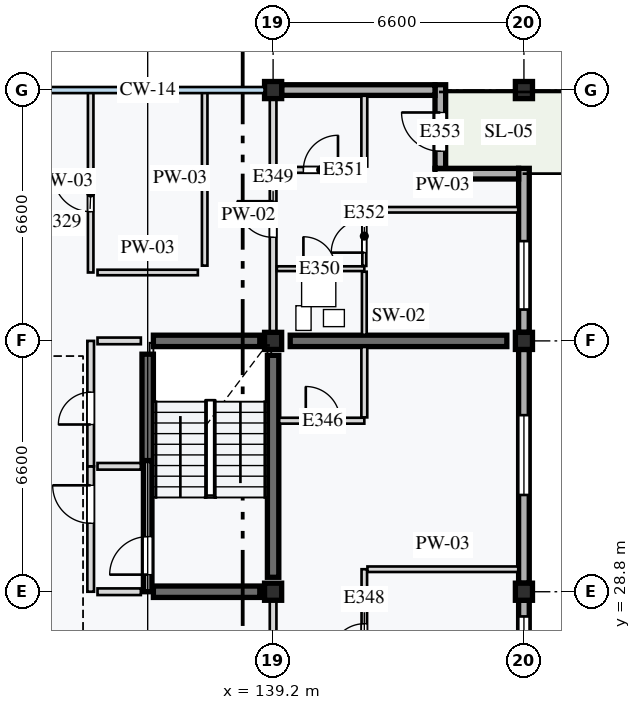
"""IFC4 building model, lengths in metres.
Left out: names, types, materials, properties, quantities, classifications, styles, units other than length and angle.
Written with IfcOpenShell. Run it as: python <this file> out.ifc"""

import sys

from ifc_helpers import new_model, si_unit, direction, frame, frame_2d, origin, origin_2d, place, context, subcontext, project, spatial, rectangle, extrude, element, fill, save


model = new_model("IFC4")
c1 = context("Model", 3, precision=1e-05, world=origin(), true_north=direction((0.0, 1.0)))
c2 = subcontext(c1, "Body", "Model", "MODEL_VIEW")
j1 = project(units=[si_unit("LENGTHUNIT", "METRE"), si_unit("PLANEANGLEUNIT", "RADIAN")], contexts=[c1])
p1 = place(None, origin())
s1 = spatial("IfcSite", under=j1, at=p1, CompositionType="ELEMENT")
p2 = place(p1, origin())
s2 = spatial("IfcBuilding", under=s1, at=p2, CompositionType="ELEMENT")
p3 = place(p2, frame((0.0, 0.0, 27.6)))
s3 = spatial("IfcBuildingStorey", under=s2, at=p3, CompositionType="ELEMENT", Elevation=27.6)
for number, where, z_axis, x_axis in (
    (1, (139.2, 28.8, 0.0), (0.0, 0.0, 1.0), (1.0, 0.0, 0.0)),
    (2, (145.8, 28.8, 0.0), (0.0, 0.0, 1.0), (1.0, 0.0, 0.0)),
    (3, (139.2, 35.4, 0.0), (0.0, 0.0, 1.0), (1.0, 0.0, 0.0)),
    (4, (145.8, 35.4, 0.0), (0.0, 0.0, 1.0), (1.0, 0.0, 0.0)),
    (5, (139.2, 42.0, 0.0), (0.0, 0.0, 1.0), (1.0, 0.0, 0.0)),
    (6, (145.8, 42.0, 0.0), (0.0, 0.0, 1.0), (1.0, 0.0, 0.0)),
):
    element("IfcColumn", number, at=place(p3, frame(where, z_axis=z_axis, x_axis=x_axis)), inside=s3, PredefinedType="COLUMN", context=c2, shape_type="SweptSolid", body=[
        extrude(rectangle(XDim=0.45, YDim=0.45, at=origin_2d()), origin(), (0.0, 0.0, 1.0), 3.2),
    ])
p4 = place(p3, frame((139.2, 29.18, 0.0), z_axis=(0.0, 0.0, 1.0), x_axis=(0.0, 1.0, 0.0)))
e7 = element("IfcWall", 7, at=p4, inside=s3, PredefinedType="SHEAR", context=c2, shape_type="SweptSolid", body=[
    extrude(rectangle(XDim=5.84, YDim=0.3, at=frame_2d((2.92, 0.0))), origin(), (0.0, 0.0, 1.0), 2.97),
])
for number, where, z_axis, x_axis in (
    (8, (135.9, 32.25, 0.0), (0.0, 0.0, 1.0), (0.0, 1.0, 0.0)),
    (9, (136.05, 28.8, 0.0), (0.0, 0.0, 1.0), (1.0, 0.0, 0.0)),
    (10, (136.05, 35.4, 0.0), (0.0, 0.0, 1.0), (1.0, 0.0, 0.0)),
):
    element("IfcWall", number, at=place(p3, frame(where, z_axis=z_axis, x_axis=x_axis)), inside=s3, PredefinedType="SHEAR", context=c2, shape_type="SweptSolid", body=[
        extrude(rectangle(XDim=2.8, YDim=0.3, at=frame_2d((1.4, 0.0))), origin(), (0.0, 0.0, 1.0), 2.97),
    ])
p5 = place(p3, frame((139.65, 35.4, 0.0), z_axis=(0.0, 0.0, 1.0), x_axis=(1.0, 0.0, 0.0)))
e11 = element("IfcWall", 11, at=p5, inside=s3, PredefinedType="SHEAR", context=c2, shape_type="SweptSolid", body=[
    extrude(rectangle(XDim=5.7, YDim=0.3, at=frame_2d((2.85, 0.0))), origin(), (0.0, 0.0, 1.0), 2.97),
])
p6 = place(p3, frame((145.8, 22.425, 0.0), z_axis=(0.0, 0.0, 1.0), x_axis=(0.0, 1.0, 0.0)))
e12 = element("IfcWall", 12, at=p6, inside=s3, PredefinedType="STANDARD", context=c2, shape_type="SweptSolid", body=[
    extrude(rectangle(XDim=6.15, YDim=0.28, at=frame_2d((3.075, 0.0))), origin(), (0.0, 0.0, 1.0), 2.65),
])
p7 = place(p6, frame((0.5, 0.0, 0.85)))
e13 = element("IfcOpeningElement", 13, at=p7, cuts=e12, PredefinedType="OPENING", context=c2, shape_type="SweptSolid", body=[
    extrude(rectangle(XDim=1.8, YDim=1.35, at=frame_2d((0.9, 0.675))), frame((0.0, 0.15, 0.0), z_axis=(0.0, -1.0, 0.0), x_axis=(1.0, 0.0, 0.0)), (0.0, 0.0, 1.0), 0.3),
])
p8 = place(p6, frame((3.925, 0.0, 0.85)))
e14 = element("IfcOpeningElement", 14, at=p8, cuts=e12, PredefinedType="OPENING", context=c2, shape_type="SweptSolid", body=[
    extrude(rectangle(XDim=1.8, YDim=1.35, at=frame_2d((0.9, 0.675))), frame((0.0, 0.15, 0.0), z_axis=(0.0, -1.0, 0.0), x_axis=(1.0, 0.0, 0.0)), (0.0, 0.0, 1.0), 0.3),
])
p9 = place(p3, frame((145.8, 29.025, 0.0), z_axis=(0.0, 0.0, 1.0), x_axis=(0.0, 1.0, 0.0)))
e15 = element("IfcWall", 15, at=p9, inside=s3, PredefinedType="STANDARD", context=c2, shape_type="SweptSolid", body=[
    extrude(rectangle(XDim=6.15, YDim=0.28, at=frame_2d((3.075, 0.0))), origin(), (0.0, 0.0, 1.0), 2.65),
])
p10 = place(p9, frame((2.321, 0.0, 0.85)))
e16 = element("IfcOpeningElement", 16, at=p10, cuts=e15, PredefinedType="OPENING", context=c2, shape_type="SweptSolid", body=[
    extrude(rectangle(XDim=2.1, YDim=1.55, at=frame_2d((1.05, 0.775))), frame((0.0, 0.15, 0.0), z_axis=(0.0, -1.0, 0.0), x_axis=(1.0, 0.0, 0.0)), (0.0, 0.0, 1.0), 0.3),
])
p11 = place(p3, frame((145.8, 35.625, 0.0), z_axis=(0.0, 0.0, 1.0), x_axis=(0.0, 1.0, 0.0)))
e17 = element("IfcWall", 17, at=p11, inside=s3, PredefinedType="STANDARD", context=c2, shape_type="SweptSolid", body=[
    extrude(rectangle(XDim=4.315, YDim=0.28, at=frame_2d((2.157, 0.0))), origin(), (0.0, 0.0, 1.0), 2.65),
])
p12 = place(p11, frame((0.6, 0.0, 0.85)))
e18 = element("IfcOpeningElement", 18, at=p12, cuts=e17, PredefinedType="OPENING", context=c2, shape_type="SweptSolid", body=[
    extrude(rectangle(XDim=1.8, YDim=1.35, at=frame_2d((0.9, 0.675))), frame((0.0, 0.15, 0.0), z_axis=(0.0, -1.0, 0.0), x_axis=(1.0, 0.0, 0.0)), (0.0, 0.0, 1.0), 0.3),
])
p13 = place(p3, frame((145.66, 39.8, 0.0), z_axis=(0.0, 0.0, 1.0), x_axis=(-1.0, 0.0, 0.0)))
e19 = element("IfcWall", 19, at=p13, inside=s3, PredefinedType="STANDARD", context=c2, shape_type="SweptSolid", body=[
    extrude(rectangle(XDim=2.2, YDim=0.28, at=frame_2d((1.1, 0.0))), origin(), (0.0, 0.0, 1.0), 2.97),
])
p14 = place(p3, frame((143.6, 39.94, 0.0), z_axis=(0.0, 0.0, 1.0), x_axis=(0.0, 1.0, 0.0)))
e20 = element("IfcWall", 20, at=p14, inside=s3, PredefinedType="STANDARD", context=c2, shape_type="SweptSolid", body=[
    extrude(rectangle(XDim=2.2, YDim=0.28, at=frame_2d((1.1, 0.0))), origin(), (0.0, 0.0, 1.0), 2.97),
])
p15 = place(p14, frame((0.45, 0.0, 0.0)))
e21 = element("IfcOpeningElement", 21, at=p15, cuts=e20, PredefinedType="OPENING", context=c2, shape_type="SweptSolid", body=[
    extrude(rectangle(XDim=1.02, YDim=2.16, at=frame_2d((0.51, 1.08))), frame((0.0, 0.15, 0.0), z_axis=(0.0, -1.0, 0.0), x_axis=(1.0, 0.0, 0.0)), (0.0, 0.0, 1.0), 0.3),
])
p16 = place(p3, frame((139.425, 42.0, 0.0), z_axis=(0.0, 0.0, 1.0), x_axis=(1.0, 0.0, 0.0)))
e22 = element("IfcWall", 22, at=p16, inside=s3, PredefinedType="STANDARD", context=c2, shape_type="SweptSolid", body=[
    extrude(rectangle(XDim=4.035, YDim=0.28, at=frame_2d((2.018, 0.0))), origin(), (0.0, 0.0, 1.0), 2.65),
])
p17 = place(p3, frame((135.9, 28.8, 0.0), z_axis=(0.0, 0.0, 1.0), x_axis=(0.0, 1.0, 0.0)))
e23 = element("IfcWall", 23, at=p17, inside=s3, PredefinedType="STANDARD", context=c2, shape_type="SweptSolid", body=[
    extrude(rectangle(XDim=3.45, YDim=0.225, at=frame_2d((1.725, 0.0))), origin(), (0.0, 0.0, 1.0), 2.97),
])
p18 = place(p17, frame((0.45, 0.0, 0.0)))
e24 = element("IfcOpeningElement", 24, at=p18, cuts=e23, PredefinedType="OPENING", context=c2, shape_type="SweptSolid", body=[
    extrude(rectangle(XDim=1.0, YDim=2.1, at=frame_2d((0.5, 1.05))), frame((0.0, 0.123, 0.0), z_axis=(0.0, -1.0, 0.0), x_axis=(1.0, 0.0, 0.0)), (0.0, 0.0, 1.0), 0.245),
])
p19 = place(p3, frame((134.4, 28.8, 0.0), z_axis=(0.0, 0.0, 1.0), x_axis=(0.0, 1.0, 0.0)))
e25 = element("IfcWall", 25, at=p19, inside=s3, PredefinedType="PARTITIONING", context=c2, shape_type="SweptSolid", body=[
    extrude(rectangle(XDim=3.3, YDim=0.175, at=frame_2d((1.65, 0.0))), origin(), (0.0, 0.0, 1.0), 2.97),
])
p20 = place(p19, frame((1.8, 0.0, 0.0)))
e26 = element("IfcOpeningElement", 26, at=p20, cuts=e25, PredefinedType="OPENING", context=c2, shape_type="SweptSolid", body=[
    extrude(rectangle(XDim=1.0, YDim=2.16, at=frame_2d((0.5, 1.08))), frame((0.0, 0.097, 0.0), z_axis=(0.0, -1.0, 0.0), x_axis=(1.0, 0.0, 0.0)), (0.0, 0.0, 1.0), 0.195),
])
p21 = place(p3, frame((134.4, 32.1, 0.0), z_axis=(0.0, 0.0, 1.0), x_axis=(0.0, 1.0, 0.0)))
e27 = element("IfcWall", 27, at=p21, inside=s3, PredefinedType="PARTITIONING", context=c2, shape_type="SweptSolid", body=[
    extrude(rectangle(XDim=3.3, YDim=0.175, at=frame_2d((1.65, 0.0))), origin(), (0.0, 0.0, 1.0), 2.97),
])
p22 = place(p21, frame((1.1, 0.0, 0.0)))
e28 = element("IfcOpeningElement", 28, at=p22, cuts=e27, PredefinedType="OPENING", context=c2, shape_type="SweptSolid", body=[
    extrude(rectangle(XDim=0.85, YDim=2.0, at=frame_2d((0.425, 1.0))), frame((0.0, 0.097, 0.0), z_axis=(0.0, -1.0, 0.0), x_axis=(1.0, 0.0, 0.0)), (0.0, 0.0, 1.0), 0.195),
])
for number, where, z_axis, x_axis in (
    (29, (134.58, 28.8, 0.0), (0.0, 0.0, 1.0), (1.0, 0.0, 0.0)),
    (30, (134.58, 32.1, 0.0), (0.0, 0.0, 1.0), (1.0, 0.0, 0.0)),
    (31, (134.58, 35.4, 0.0), (0.0, 0.0, 1.0), (1.0, 0.0, 0.0)),
):
    element("IfcWall", number, at=place(p3, frame(where, z_axis=z_axis, x_axis=x_axis)), inside=s3, PredefinedType="PARTITIONING", context=c2, shape_type="SweptSolid", body=[
        extrude(rectangle(XDim=1.14, YDim=0.175, at=frame_2d((0.57, 0.0))), origin(), (0.0, 0.0, 1.0), 2.97),
    ])
p23 = place(p3, frame((134.4, 37.2, 0.0), z_axis=(0.0, 0.0, 1.0), x_axis=(0.0, 1.0, 0.0)))
e32 = element("IfcWall", 32, at=p23, inside=s3, PredefinedType="PARTITIONING", context=c2, shape_type="SweptSolid", body=[
    extrude(rectangle(XDim=4.8, YDim=0.145, at=frame_2d((2.4, 0.0))), origin(), (0.0, 0.0, 1.0), 2.97),
])
p24 = place(p23, frame((1.6, 0.0, 0.0)))
e33 = element("IfcOpeningElement", 33, at=p24, cuts=e32, PredefinedType="OPENING", context=c2, shape_type="SweptSolid", body=[
    extrude(rectangle(XDim=0.98, YDim=2.12, at=frame_2d((0.49, 1.06))), frame((0.0, 0.083, 0.0), z_axis=(0.0, -1.0, 0.0), x_axis=(1.0, 0.0, 0.0)), (0.0, 0.0, 1.0), 0.165),
])
p25 = place(p3, frame((137.4, 37.38, 0.0), z_axis=(0.0, 0.0, 1.0), x_axis=(0.0, 1.0, 0.0)))
e34 = element("IfcWall", 34, at=p25, inside=s3, PredefinedType="PARTITIONING", context=c2, shape_type="SweptSolid", body=[
    extrude(rectangle(XDim=4.6, YDim=0.145, at=frame_2d((2.3, 0.0))), origin(), (0.0, 0.0, 1.0), 2.97),
])
p26 = place(p3, frame((134.58, 37.2, 0.0), z_axis=(0.0, 0.0, 1.0), x_axis=(1.0, 0.0, 0.0)))
e35 = element("IfcWall", 35, at=p26, inside=s3, PredefinedType="PARTITIONING", context=c2, shape_type="SweptSolid", body=[
    extrude(rectangle(XDim=2.64, YDim=0.145, at=frame_2d((1.32, 0.0))), origin(), (0.0, 0.0, 1.0), 2.97),
])
p27 = place(p3, frame((139.2, 22.2, 0.0), z_axis=(0.0, 0.0, 1.0), x_axis=(0.0, 1.0, 0.0)))
e36 = element("IfcWall", 36, at=p27, inside=s3, PredefinedType="PARTITIONING", context=c2, shape_type="SweptSolid", body=[
    extrude(rectangle(XDim=6.6, YDim=0.175, at=frame_2d((3.3, 0.0))), origin(), (0.0, 0.0, 1.0), 2.55),
])
p28 = place(p27, frame((3.85, 0.0, 0.0)))
e37 = element("IfcOpeningElement", 37, at=p28, cuts=e36, PredefinedType="OPENING", context=c2, shape_type="SweptSolid", body=[
    extrude(rectangle(XDim=0.95, YDim=2.1, at=frame_2d((0.475, 1.05))), frame((0.0, 0.097, 0.0), z_axis=(0.0, -1.0, 0.0), x_axis=(1.0, 0.0, 0.0)), (0.0, 0.0, 1.0), 0.195),
])
p29 = place(p3, frame((139.36, 33.3, 0.0), z_axis=(0.0, 0.0, 1.0), x_axis=(1.0, 0.0, 0.0)))
e38 = element("IfcWall", 38, at=p29, inside=s3, PredefinedType="PARTITIONING", context=c2, shape_type="SweptSolid", body=[
    extrude(rectangle(XDim=2.24, YDim=0.155, at=frame_2d((1.12, 0.0))), origin(), (0.0, 0.0, 1.0), 2.97),
])
p30 = place(p29, frame((0.7, 0.0, 0.0)))
e39 = element("IfcOpeningElement", 39, at=p30, cuts=e38, PredefinedType="OPENING", context=c2, shape_type="SweptSolid", body=[
    extrude(rectangle(XDim=0.9, YDim=2.16, at=frame_2d((0.45, 1.08))), frame((0.0, 0.087, 0.0), z_axis=(0.0, -1.0, 0.0), x_axis=(1.0, 0.0, 0.0)), (0.0, 0.0, 1.0), 0.175),
])
p31 = place(p3, frame((141.6, 33.387, 0.0), z_axis=(0.0, 0.0, 1.0), x_axis=(0.0, 1.0, 0.0)))
e40 = element("IfcWall", 40, at=p31, inside=s3, PredefinedType="PARTITIONING", context=c2, shape_type="SweptSolid", body=[
    extrude(rectangle(XDim=1.853, YDim=0.155, at=frame_2d((0.926, 0.0))), origin(), (0.0, 0.0, 1.0), 2.97),
])
p32 = place(p3, frame((141.6, 25.532, 0.0), z_axis=(0.0, 0.0, 1.0), x_axis=(0.0, 1.0, 0.0)))
e41 = element("IfcWall", 41, at=p32, inside=s3, PredefinedType="PARTITIONING", context=c2, shape_type="SweptSolid", body=[
    extrude(rectangle(XDim=3.86, YDim=0.145, at=frame_2d((1.93, 0.0))), origin(), (0.0, 0.0, 1.0), 2.97),
])
p33 = place(p32, frame((1.546, 0.0, 0.0)))
e42 = element("IfcOpeningElement", 42, at=p33, cuts=e41, PredefinedType="OPENING", context=c2, shape_type="SweptSolid", body=[
    extrude(rectangle(XDim=0.88, YDim=2.1, at=frame_2d((0.44, 1.05))), frame((0.0, 0.083, 0.0), z_axis=(0.0, -1.0, 0.0), x_axis=(1.0, 0.0, 0.0)), (0.0, 0.0, 1.0), 0.165),
])
p34 = place(p3, frame((141.683, 29.392, 0.0), z_axis=(0.0, 0.0, 1.0), x_axis=(1.0, 0.0, 0.0)))
e43 = element("IfcWall", 43, at=p34, inside=s3, PredefinedType="PARTITIONING", context=c2, shape_type="SweptSolid", body=[
    extrude(rectangle(XDim=3.967, YDim=0.145, at=frame_2d((1.984, 0.0))), origin(), (0.0, 0.0, 1.0), 2.97),
])
p35 = place(p3, frame((139.2, 35.4, 0.0), z_axis=(0.0, 0.0, 1.0), x_axis=(0.0, 1.0, 0.0)))
e44 = element("IfcWall", 44, at=p35, inside=s3, PredefinedType="PARTITIONING", context=c2, shape_type="SweptSolid", body=[
    extrude(rectangle(XDim=6.6, YDim=0.175, at=frame_2d((3.3, 0.0))), origin(), (0.0, 0.0, 1.0), 2.55),
])
p36 = place(p35, frame((2.725, 0.0, 0.0)))
e45 = element("IfcOpeningElement", 45, at=p36, cuts=e44, PredefinedType="OPENING", context=c2, shape_type="SweptSolid", body=[
    extrude(rectangle(XDim=0.95, YDim=2.16, at=frame_2d((0.475, 1.08))), frame((0.0, 0.097, 0.0), z_axis=(0.0, -1.0, 0.0), x_axis=(1.0, 0.0, 0.0)), (0.0, 0.0, 1.0), 0.195),
])
p37 = place(p3, frame((139.298, 37.3, 0.0), z_axis=(0.0, 0.0, 1.0), x_axis=(1.0, 0.0, 0.0)))
e46 = element("IfcWall", 46, at=p37, inside=s3, PredefinedType="PARTITIONING", context=c2, shape_type="SweptSolid", body=[
    extrude(rectangle(XDim=2.302, YDim=0.125, at=frame_2d((1.151, 0.0))), origin(), (0.0, 0.0, 1.0), 2.97),
])
p38 = place(p37, frame((0.7, 0.0, 0.0)))
e47 = element("IfcOpeningElement", 47, at=p38, cuts=e46, PredefinedType="OPENING", context=c2, shape_type="SweptSolid", body=[
    extrude(rectangle(XDim=0.84, YDim=2.06, at=frame_2d((0.42, 1.03))), frame((0.0, 0.073, 0.0), z_axis=(0.0, -1.0, 0.0), x_axis=(1.0, 0.0, 0.0)), (0.0, 0.0, 1.0), 0.145),
])
p39 = place(p3, frame((141.6, 35.56, 0.0), z_axis=(0.0, 0.0, 1.0), x_axis=(0.0, 1.0, 0.0)))
e48 = element("IfcWall", 48, at=p39, inside=s3, PredefinedType="PARTITIONING", context=c2, shape_type="SweptSolid", body=[
    extrude(rectangle(XDim=1.66, YDim=0.125, at=frame_2d((0.83, 0.0))), origin(), (0.0, 0.0, 1.0), 2.97),
])
p40 = place(p3, frame((139.298, 39.9, 0.0), z_axis=(0.0, 0.0, 1.0), x_axis=(1.0, 0.0, 0.0)))
e49 = element("IfcWall", 49, at=p40, inside=s3, PredefinedType="PARTITIONING", context=c2, shape_type="SweptSolid", body=[
    extrude(rectangle(XDim=2.302, YDim=0.155, at=frame_2d((1.151, 0.0))), origin(), (0.0, 0.0, 1.0), 2.97),
])
p41 = place(p40, frame((0.7, 0.0, 0.0)))
e50 = element("IfcOpeningElement", 50, at=p41, cuts=e49, PredefinedType="OPENING", context=c2, shape_type="SweptSolid", body=[
    extrude(rectangle(XDim=0.91, YDim=2.14, at=frame_2d((0.455, 1.07))), frame((0.0, 0.087, 0.0), z_axis=(0.0, -1.0, 0.0), x_axis=(1.0, 0.0, 0.0)), (0.0, 0.0, 1.0), 0.175),
])
p42 = place(p3, frame((141.6, 39.988, 0.0), z_axis=(0.0, 0.0, 1.0), x_axis=(0.0, 1.0, 0.0)))
e51 = element("IfcWall", 51, at=p42, inside=s3, PredefinedType="PARTITIONING", context=c2, shape_type="SweptSolid", body=[
    extrude(rectangle(XDim=1.863, YDim=0.155, at=frame_2d((0.931, 0.0))), origin(), (0.0, 0.0, 1.0), 2.97),
])
p43 = place(p3, frame((141.6, 37.373, 0.0), z_axis=(0.0, 0.0, 1.0), x_axis=(0.0, 1.0, 0.0)))
e52 = element("IfcWall", 52, at=p43, inside=s3, PredefinedType="PARTITIONING", context=c2, shape_type="SweptSolid", body=[
    extrude(rectangle(XDim=1.478, YDim=0.105, at=frame_2d((0.739, 0.0))), origin(), (0.0, 0.0, 1.0), 2.97),
])
p44 = place(p43, frame((0.35, 0.0, 0.0)))
e53 = element("IfcOpeningElement", 53, at=p44, cuts=e52, PredefinedType="OPENING", context=c2, shape_type="SweptSolid", body=[
    extrude(rectangle(XDim=0.87, YDim=2.08, at=frame_2d((0.435, 1.04))), frame((0.0, 0.062, 0.0), z_axis=(0.0, -1.0, 0.0), x_axis=(1.0, 0.0, 0.0)), (0.0, 0.0, 1.0), 0.125),
])
p45 = place(p3, frame((141.68, 38.85, 0.0), z_axis=(0.0, 0.0, 1.0), x_axis=(1.0, 0.0, 0.0)))
e54 = element("IfcWall", 54, at=p45, inside=s3, PredefinedType="PARTITIONING", context=c2, shape_type="SweptSolid", body=[
    extrude(rectangle(XDim=3.97, YDim=0.145, at=frame_2d((1.985, 0.0))), origin(), (0.0, 0.0, 1.0), 2.97),
])
p46 = place(p8, origin())
e55 = element("IfcWindow", 55, at=p46, inside=s3, PartitioningType="SINGLE_PANEL", PredefinedType="WINDOW", context=c2, shape_type="SweptSolid", body=[
    extrude(rectangle(XDim=1.8, YDim=1.35, at=frame_2d((0.9, 0.675))), frame((0.0, 0.03, 0.0), z_axis=(0.0, -1.0, 0.0), x_axis=(1.0, 0.0, 0.0)), (0.0, 0.0, 1.0), 0.06),
])
fill(e14, e55)
p47 = place(p10, origin())
e56 = element("IfcWindow", 56, at=p47, inside=s3, PartitioningType="SINGLE_PANEL", PredefinedType="WINDOW", context=c2, shape_type="SweptSolid", body=[
    extrude(rectangle(XDim=2.1, YDim=1.55, at=frame_2d((1.05, 0.775))), frame((0.0, 0.03, 0.0), z_axis=(0.0, -1.0, 0.0), x_axis=(1.0, 0.0, 0.0)), (0.0, 0.0, 1.0), 0.06),
])
fill(e16, e56)
p48 = place(p12, origin())
e57 = element("IfcWindow", 57, at=p48, inside=s3, PartitioningType="SINGLE_PANEL", PredefinedType="WINDOW", context=c2, shape_type="SweptSolid", body=[
    extrude(rectangle(XDim=1.8, YDim=1.35, at=frame_2d((0.9, 0.675))), frame((0.0, 0.03, 0.0), z_axis=(0.0, -1.0, 0.0), x_axis=(1.0, 0.0, 0.0)), (0.0, 0.0, 1.0), 0.06),
])
fill(e18, e57)
p49 = place(p15, origin())
e58 = element("IfcDoor", 58, at=p49, inside=s3, OperationType="SINGLE_SWING_RIGHT", PredefinedType="DOOR", context=c2, shape_type="SweptSolid", body=[
    extrude(rectangle(XDim=1.02, YDim=2.16, at=frame_2d((0.51, 1.08))), frame((0.0, 0.025, 0.0), z_axis=(0.0, -1.0, 0.0), x_axis=(1.0, 0.0, 0.0)), (0.0, 0.0, 1.0), 0.05),
])
fill(e21, e58)
p50 = place(p18, origin())
e59 = element("IfcDoor", 59, at=p50, inside=s3, OperationType="SINGLE_SWING_LEFT", PredefinedType="DOOR", context=c2, shape_type="SweptSolid", body=[
    extrude(rectangle(XDim=1.0, YDim=2.1, at=frame_2d((0.5, 1.05))), frame((0.0, 0.025, 0.0), z_axis=(0.0, -1.0, 0.0), x_axis=(1.0, 0.0, 0.0)), (0.0, 0.0, 1.0), 0.05),
])
fill(e24, e59)
p51 = place(p20, origin())
e60 = element("IfcDoor", 60, at=p51, inside=s3, OperationType="SINGLE_SWING_RIGHT", PredefinedType="DOOR", context=c2, shape_type="SweptSolid", body=[
    extrude(rectangle(XDim=1.0, YDim=2.16, at=frame_2d((0.5, 1.08))), frame((0.0, 0.025, 0.0), z_axis=(0.0, -1.0, 0.0), x_axis=(1.0, 0.0, 0.0)), (0.0, 0.0, 1.0), 0.05),
])
fill(e26, e60)
p52 = place(p22, origin())
e61 = element("IfcDoor", 61, at=p52, inside=s3, OperationType="SINGLE_SWING_LEFT", PredefinedType="DOOR", context=c2, shape_type="SweptSolid", body=[
    extrude(rectangle(XDim=0.85, YDim=2.0, at=frame_2d((0.425, 1.0))), frame((0.0, 0.025, 0.0), z_axis=(0.0, -1.0, 0.0), x_axis=(1.0, 0.0, 0.0)), (0.0, 0.0, 1.0), 0.05),
])
fill(e28, e61)
p53 = place(p24, origin())
e62 = element("IfcDoor", 62, at=p53, inside=s3, OperationType="SINGLE_SWING_RIGHT", PredefinedType="DOOR", context=c2, shape_type="SweptSolid", body=[
    extrude(rectangle(XDim=0.98, YDim=2.12, at=frame_2d((0.49, 1.06))), frame((0.0, 0.025, 0.0), z_axis=(0.0, -1.0, 0.0), x_axis=(1.0, 0.0, 0.0)), (0.0, 0.0, 1.0), 0.05),
])
fill(e33, e62)
p54 = place(p30, origin())
e63 = element("IfcDoor", 63, at=p54, inside=s3, OperationType="SINGLE_SWING_LEFT", PredefinedType="DOOR", context=c2, shape_type="SweptSolid", body=[
    extrude(rectangle(XDim=0.9, YDim=2.16, at=frame_2d((0.45, 1.08))), frame((0.0, 0.025, 0.0), z_axis=(0.0, -1.0, 0.0), x_axis=(1.0, 0.0, 0.0)), (0.0, 0.0, 1.0), 0.05),
])
fill(e39, e63)
p55 = place(p33, origin())
e64 = element("IfcDoor", 64, at=p55, inside=s3, OperationType="SINGLE_SWING_LEFT", PredefinedType="DOOR", context=c2, shape_type="SweptSolid", body=[
    extrude(rectangle(XDim=0.88, YDim=2.1, at=frame_2d((0.44, 1.05))), frame((0.0, 0.025, 0.0), z_axis=(0.0, -1.0, 0.0), x_axis=(1.0, 0.0, 0.0)), (0.0, 0.0, 1.0), 0.05),
])
fill(e42, e64)
p56 = place(p36, origin())
e65 = element("IfcDoor", 65, at=p56, inside=s3, OperationType="SINGLE_SWING_RIGHT", PredefinedType="DOOR", context=c2, shape_type="SweptSolid", body=[
    extrude(rectangle(XDim=0.95, YDim=2.16, at=frame_2d((0.475, 1.08))), frame((0.0, 0.025, 0.0), z_axis=(0.0, -1.0, 0.0), x_axis=(1.0, 0.0, 0.0)), (0.0, 0.0, 1.0), 0.05),
])
fill(e45, e65)
p57 = place(p38, origin())
e66 = element("IfcDoor", 66, at=p57, inside=s3, OperationType="SINGLE_SWING_LEFT", PredefinedType="DOOR", context=c2, shape_type="SweptSolid", body=[
    extrude(rectangle(XDim=0.84, YDim=2.06, at=frame_2d((0.42, 1.03))), frame((0.0, 0.025, 0.0), z_axis=(0.0, -1.0, 0.0), x_axis=(1.0, 0.0, 0.0)), (0.0, 0.0, 1.0), 0.05),
])
fill(e47, e66)
p58 = place(p41, origin())
e67 = element("IfcDoor", 67, at=p58, inside=s3, OperationType="SINGLE_SWING_RIGHT", PredefinedType="DOOR", context=c2, shape_type="SweptSolid", body=[
    extrude(rectangle(XDim=0.91, YDim=2.14, at=frame_2d((0.455, 1.07))), frame((0.0, 0.025, 0.0), z_axis=(0.0, -1.0, 0.0), x_axis=(1.0, 0.0, 0.0)), (0.0, 0.0, 1.0), 0.05),
])
fill(e50, e67)
p59 = place(p44, origin())
e68 = element("IfcDoor", 68, at=p59, inside=s3, OperationType="SINGLE_SWING_LEFT", PredefinedType="DOOR", context=c2, shape_type="SweptSolid", body=[
    extrude(rectangle(XDim=0.87, YDim=2.08, at=frame_2d((0.435, 1.04))), frame((0.0, 0.025, 0.0), z_axis=(0.0, -1.0, 0.0), x_axis=(1.0, 0.0, 0.0)), (0.0, 0.0, 1.0), 0.05),
])
fill(e53, e68)
save(model, sys.argv[1])
